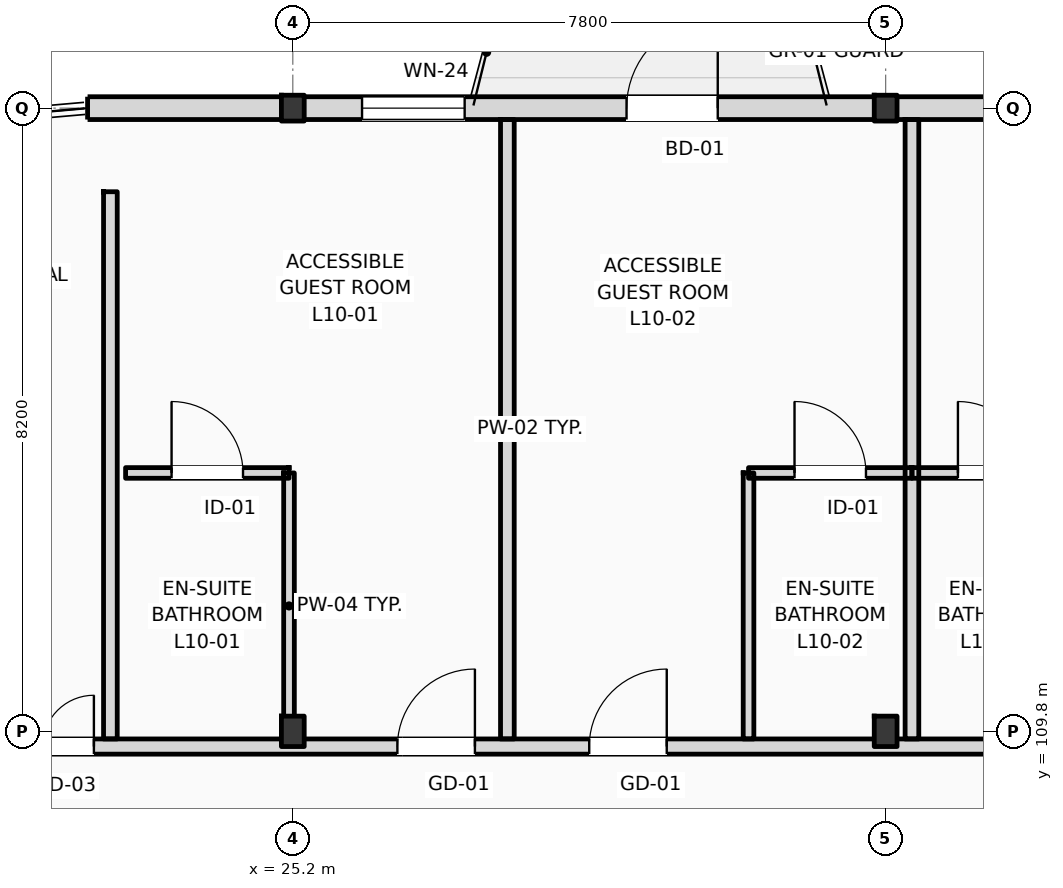
"""IFC4 building model, lengths in metres.
Left out: names, types, materials, properties, quantities, classifications, styles, units other than length and angle.
Written with IfcOpenShell. Run it as: python <this file> out.ifc"""

import sys

from ifc_helpers import new_model, si_unit, direction, frame, frame_2d, origin, origin_2d, place, context, subcontext, project, spatial, rectangle, i_section, extrude, element, fill, save


model = new_model("IFC4")
c1 = context("Model", 3, precision=1e-05, world=origin(), true_north=direction((0.0, 1.0)))
c2 = subcontext(c1, "Body", "Model", "MODEL_VIEW")
j1 = project(units=[si_unit("LENGTHUNIT", "METRE"), si_unit("PLANEANGLEUNIT", "RADIAN")], contexts=[c1])
p1 = place(None, origin())
s1 = spatial("IfcSite", under=j1, at=p1, CompositionType="ELEMENT")
p2 = place(p1, origin())
s2 = spatial("IfcBuilding", under=s1, at=p2, CompositionType="ELEMENT")
p3 = place(p2, frame((0.0, 0.0, 42.6)))
s3 = spatial("IfcBuildingStorey", under=s2, at=p3, CompositionType="ELEMENT", Elevation=42.6)
p4 = place(p3, frame((25.2, 109.8, 0.0), z_axis=(0.0, 0.0, 1.0), x_axis=(1.0, 0.0, 0.0)))
e1 = element("IfcColumn", 1, at=p4, inside=s3, PredefinedType="COLUMN", context=c2, shape_type="SweptSolid", body=[
    extrude(i_section(OverallWidth=0.3, OverallDepth=0.4, WebThickness=0.013, FlangeThickness=0.024, FilletRadius=0.027, at=origin_2d()), origin(), (0.0, 0.0, 1.0), 4.2),
])
p5 = place(p3, frame((25.2, 118.0, 0.0), z_axis=(0.0, 0.0, 1.0), x_axis=(1.0, 0.0, 0.0)))
e2 = element("IfcColumn", 2, at=p5, inside=s3, PredefinedType="COLUMN", context=c2, shape_type="SweptSolid", body=[
    extrude(i_section(OverallWidth=0.3, OverallDepth=0.34, WebThickness=0.012, FlangeThickness=0.021, FilletRadius=0.027, at=origin_2d()), origin(), (0.0, 0.0, 1.0), 4.2),
])
p6 = place(p3, frame((33.0, 109.8, 0.0), z_axis=(0.0, 0.0, 1.0), x_axis=(1.0, 0.0, 0.0)))
e3 = element("IfcColumn", 3, at=p6, inside=s3, PredefinedType="COLUMN", context=c2, shape_type="SweptSolid", body=[
    extrude(i_section(OverallWidth=0.3, OverallDepth=0.4, WebThickness=0.013, FlangeThickness=0.024, FilletRadius=0.027, at=origin_2d()), origin(), (0.0, 0.0, 1.0), 4.2),
])
p7 = place(p3, frame((33.0, 118.0, 0.0), z_axis=(0.0, 0.0, 1.0), x_axis=(1.0, 0.0, 0.0)))
e4 = element("IfcColumn", 4, at=p7, inside=s3, PredefinedType="COLUMN", context=c2, shape_type="SweptSolid", body=[
    extrude(i_section(OverallWidth=0.3, OverallDepth=0.34, WebThickness=0.012, FlangeThickness=0.021, FilletRadius=0.027, at=origin_2d()), origin(), (0.0, 0.0, 1.0), 4.2),
])
p8 = place(p3, frame((22.5, 118.0, 0.0), z_axis=(0.0, 0.0, 1.0), x_axis=(1.0, 0.0, 0.0)))
e5 = element("IfcWall", 5, at=p8, inside=s3, PredefinedType="STANDARD", context=c2, shape_type="SweptSolid", body=[
    extrude(rectangle(XDim=72.9, YDim=0.3, at=frame_2d((36.45, 0.0))), origin(), (0.0, 0.0, 1.0), 3.42),
])
p9 = place(p8, frame((3.611, 0.0, 0.9)))
e6 = element("IfcOpeningElement", 6, at=p9, cuts=e5, PredefinedType="OPENING", context=c2, shape_type="SweptSolid", body=[
    extrude(rectangle(XDim=1.35, YDim=1.75, at=frame_2d((0.675, 0.875))), frame((0.0, 0.16, 0.0), z_axis=(0.0, -1.0, 0.0), x_axis=(1.0, 0.0, 0.0)), (0.0, 0.0, 1.0), 0.32),
])
p10 = place(p8, frame((7.091, 0.0, 0.0)))
e7 = element("IfcOpeningElement", 7, at=p10, cuts=e5, PredefinedType="OPENING", context=c2, shape_type="SweptSolid", body=[
    extrude(rectangle(XDim=1.2, YDim=2.25, at=frame_2d((0.6, 1.125))), frame((0.0, 0.16, 0.0), z_axis=(0.0, -1.0, 0.0), x_axis=(1.0, 0.0, 0.0)), (0.0, 0.0, 1.0), 0.32),
])
p11 = place(p8, frame((12.328, 0.0, 0.9)))
e8 = element("IfcOpeningElement", 8, at=p11, cuts=e5, PredefinedType="OPENING", context=c2, shape_type="SweptSolid", body=[
    extrude(rectangle(XDim=2.0, YDim=2.34, at=frame_2d((1.0, 1.17))), frame((0.0, 0.16, 0.0), z_axis=(0.0, -1.0, 0.0), x_axis=(1.0, 0.0, 0.0)), (0.0, 0.0, 1.0), 0.32),
])
p12 = place(p8, frame((19.12, 0.0, 0.9)))
e9 = element("IfcOpeningElement", 9, at=p12, cuts=e5, PredefinedType="OPENING", context=c2, shape_type="SweptSolid", body=[
    extrude(rectangle(XDim=1.35, YDim=2.34, at=frame_2d((0.675, 1.17))), frame((0.0, 0.16, 0.0), z_axis=(0.0, -1.0, 0.0), x_axis=(1.0, 0.0, 0.0)), (0.0, 0.0, 1.0), 0.32),
])
p13 = place(p8, frame((22.696, 0.0, 0.0)))
e10 = element("IfcOpeningElement", 10, at=p13, cuts=e5, PredefinedType="OPENING", context=c2, shape_type="SweptSolid", body=[
    extrude(rectangle(XDim=1.2, YDim=2.25, at=frame_2d((0.6, 1.125))), frame((0.0, 0.16, 0.0), z_axis=(0.0, -1.0, 0.0), x_axis=(1.0, 0.0, 0.0)), (0.0, 0.0, 1.0), 0.32),
])
p14 = place(p8, frame((27.205, 0.0, 0.9)))
e11 = element("IfcOpeningElement", 11, at=p14, cuts=e5, PredefinedType="OPENING", context=c2, shape_type="SweptSolid", body=[
    extrude(rectangle(XDim=3.1, YDim=2.34, at=frame_2d((1.55, 1.17))), frame((0.0, 0.16, 0.0), z_axis=(0.0, -1.0, 0.0), x_axis=(1.0, 0.0, 0.0)), (0.0, 0.0, 1.0), 0.32),
])
p15 = place(p8, frame((31.948, 0.0, 0.9)))
e12 = element("IfcOpeningElement", 12, at=p15, cuts=e5, PredefinedType="OPENING", context=c2, shape_type="SweptSolid", body=[
    extrude(rectangle(XDim=1.1, YDim=2.34, at=frame_2d((0.55, 1.17))), frame((0.0, 0.16, 0.0), z_axis=(0.0, -1.0, 0.0), x_axis=(1.0, 0.0, 0.0)), (0.0, 0.0, 1.0), 0.32),
])
p16 = place(p8, frame((38.12, 0.0, 0.0)))
e13 = element("IfcOpeningElement", 13, at=p16, cuts=e5, PredefinedType="OPENING", context=c2, shape_type="SweptSolid", body=[
    extrude(rectangle(XDim=1.2, YDim=2.25, at=frame_2d((0.6, 1.125))), frame((0.0, 0.16, 0.0), z_axis=(0.0, -1.0, 0.0), x_axis=(1.0, 0.0, 0.0)), (0.0, 0.0, 1.0), 0.32),
])
p17 = place(p8, frame((43.51, 0.0, 0.9)))
e14 = element("IfcOpeningElement", 14, at=p17, cuts=e5, PredefinedType="OPENING", context=c2, shape_type="SweptSolid", body=[
    extrude(rectangle(XDim=1.35, YDim=1.85, at=frame_2d((0.675, 0.925))), frame((0.0, 0.16, 0.0), z_axis=(0.0, -1.0, 0.0), x_axis=(1.0, 0.0, 0.0)), (0.0, 0.0, 1.0), 0.32),
])
p18 = place(p8, frame((47.178, 0.0, 0.9)))
e15 = element("IfcOpeningElement", 15, at=p18, cuts=e5, PredefinedType="OPENING", context=c2, shape_type="SweptSolid", body=[
    extrude(rectangle(XDim=1.5, YDim=1.9, at=frame_2d((0.75, 0.95))), frame((0.0, 0.16, 0.0), z_axis=(0.0, -1.0, 0.0), x_axis=(1.0, 0.0, 0.0)), (0.0, 0.0, 1.0), 0.32),
])
p19 = place(p8, frame((53.724, 0.0, 0.0)))
e16 = element("IfcOpeningElement", 16, at=p19, cuts=e5, PredefinedType="OPENING", context=c2, shape_type="SweptSolid", body=[
    extrude(rectangle(XDim=1.2, YDim=2.25, at=frame_2d((0.6, 1.125))), frame((0.0, 0.16, 0.0), z_axis=(0.0, -1.0, 0.0), x_axis=(1.0, 0.0, 0.0)), (0.0, 0.0, 1.0), 0.32),
])
p20 = place(p8, frame((58.712, 0.0, 0.9)))
e17 = element("IfcOpeningElement", 17, at=p20, cuts=e5, PredefinedType="OPENING", context=c2, shape_type="SweptSolid", body=[
    extrude(rectangle(XDim=1.8, YDim=2.0, at=frame_2d((0.9, 1.0))), frame((0.0, 0.16, 0.0), z_axis=(0.0, -1.0, 0.0), x_axis=(1.0, 0.0, 0.0)), (0.0, 0.0, 1.0), 0.32),
])
p21 = place(p8, frame((62.781, 0.0, 0.9)))
e18 = element("IfcOpeningElement", 18, at=p21, cuts=e5, PredefinedType="OPENING", context=c2, shape_type="SweptSolid", body=[
    extrude(rectangle(XDim=1.35, YDim=2.05, at=frame_2d((0.675, 1.025))), frame((0.0, 0.16, 0.0), z_axis=(0.0, -1.0, 0.0), x_axis=(1.0, 0.0, 0.0)), (0.0, 0.0, 1.0), 0.32),
])
p22 = place(p8, frame((68.819, 0.0, 0.9)))
e19 = element("IfcOpeningElement", 19, at=p22, cuts=e5, PredefinedType="OPENING", context=c2, shape_type="SweptSolid", body=[
    extrude(rectangle(XDim=2.1, YDim=2.1, at=frame_2d((1.05, 1.05))), frame((0.0, 0.16, 0.0), z_axis=(0.0, -1.0, 0.0), x_axis=(1.0, 0.0, 0.0)), (0.0, 0.0, 1.0), 0.32),
])
p23 = place(p3, frame((10.65, 109.6, 0.0), z_axis=(0.0, 0.0, 1.0), x_axis=(1.0, 0.0, 0.0)))
e20 = element("IfcWall", 20, at=p23, inside=s3, PredefinedType="PARTITIONING", context=c2, shape_type="SweptSolid", body=[
    extrude(rectangle(XDim=84.61, YDim=0.2, at=frame_2d((42.305, 0.0))), origin(), (0.0, 0.0, 1.0), 3.38),
])
p24 = place(p23, frame((15.926, 0.0, 0.0)))
e21 = element("IfcOpeningElement", 21, at=p24, cuts=e20, PredefinedType="OPENING", context=c2, shape_type="SweptSolid", body=[
    extrude(rectangle(XDim=1.02, YDim=2.2, at=frame_2d((0.51, 1.1))), frame((0.0, 0.11, 0.0), z_axis=(0.0, -1.0, 0.0), x_axis=(1.0, 0.0, 0.0)), (0.0, 0.0, 1.0), 0.22),
])
p25 = place(p23, frame((18.45, 0.0, 0.0)))
e22 = element("IfcOpeningElement", 22, at=p25, cuts=e20, PredefinedType="OPENING", context=c2, shape_type="SweptSolid", body=[
    extrude(rectangle(XDim=1.02, YDim=2.2, at=frame_2d((0.51, 1.1))), frame((0.0, 0.11, 0.0), z_axis=(0.0, -1.0, 0.0), x_axis=(1.0, 0.0, 0.0)), (0.0, 0.0, 1.0), 0.22),
])
p26 = place(p23, frame((25.742, 0.0, 0.0)))
e23 = element("IfcOpeningElement", 23, at=p26, cuts=e20, PredefinedType="OPENING", context=c2, shape_type="SweptSolid", body=[
    extrude(rectangle(XDim=1.02, YDim=2.2, at=frame_2d((0.51, 1.1))), frame((0.0, 0.11, 0.0), z_axis=(0.0, -1.0, 0.0), x_axis=(1.0, 0.0, 0.0)), (0.0, 0.0, 1.0), 0.22),
])
p27 = place(p23, frame((31.385, 0.0, 0.0)))
e24 = element("IfcOpeningElement", 24, at=p27, cuts=e20, PredefinedType="OPENING", context=c2, shape_type="SweptSolid", body=[
    extrude(rectangle(XDim=1.02, YDim=2.2, at=frame_2d((0.51, 1.1))), frame((0.0, 0.11, 0.0), z_axis=(0.0, -1.0, 0.0), x_axis=(1.0, 0.0, 0.0)), (0.0, 0.0, 1.0), 0.22),
])
p28 = place(p23, frame((33.908, 0.0, 0.0)))
e25 = element("IfcOpeningElement", 25, at=p28, cuts=e20, PredefinedType="OPENING", context=c2, shape_type="SweptSolid", body=[
    extrude(rectangle(XDim=0.96, YDim=2.2, at=frame_2d((0.48, 1.1))), frame((0.0, 0.11, 0.0), z_axis=(0.0, -1.0, 0.0), x_axis=(1.0, 0.0, 0.0)), (0.0, 0.0, 1.0), 0.22),
])
p29 = place(p23, frame((41.201, 0.0, 0.0)))
e26 = element("IfcOpeningElement", 26, at=p29, cuts=e20, PredefinedType="OPENING", context=c2, shape_type="SweptSolid", body=[
    extrude(rectangle(XDim=0.96, YDim=2.2, at=frame_2d((0.48, 1.1))), frame((0.0, 0.11, 0.0), z_axis=(0.0, -1.0, 0.0), x_axis=(1.0, 0.0, 0.0)), (0.0, 0.0, 1.0), 0.22),
])
p30 = place(p23, frame((46.844, 0.0, 0.0)))
e27 = element("IfcOpeningElement", 27, at=p30, cuts=e20, PredefinedType="OPENING", context=c2, shape_type="SweptSolid", body=[
    extrude(rectangle(XDim=0.96, YDim=2.2, at=frame_2d((0.48, 1.1))), frame((0.0, 0.11, 0.0), z_axis=(0.0, -1.0, 0.0), x_axis=(1.0, 0.0, 0.0)), (0.0, 0.0, 1.0), 0.22),
])
p31 = place(p23, frame((49.337, 0.0, 0.0)))
e28 = element("IfcOpeningElement", 28, at=p31, cuts=e20, PredefinedType="OPENING", context=c2, shape_type="SweptSolid", body=[
    extrude(rectangle(XDim=0.96, YDim=2.2, at=frame_2d((0.48, 1.1))), frame((0.0, 0.11, 0.0), z_axis=(0.0, -1.0, 0.0), x_axis=(1.0, 0.0, 0.0)), (0.0, 0.0, 1.0), 0.22),
])
p32 = place(p23, frame((56.63, 0.0, 0.0)))
e29 = element("IfcOpeningElement", 29, at=p32, cuts=e20, PredefinedType="OPENING", context=c2, shape_type="SweptSolid", body=[
    extrude(rectangle(XDim=0.96, YDim=2.2, at=frame_2d((0.48, 1.1))), frame((0.0, 0.11, 0.0), z_axis=(0.0, -1.0, 0.0), x_axis=(1.0, 0.0, 0.0)), (0.0, 0.0, 1.0), 0.22),
])
p33 = place(p23, frame((62.523, 0.0, 0.0)))
e30 = element("IfcOpeningElement", 30, at=p33, cuts=e20, PredefinedType="OPENING", context=c2, shape_type="SweptSolid", body=[
    extrude(rectangle(XDim=0.96, YDim=2.2, at=frame_2d((0.48, 1.1))), frame((0.0, 0.11, 0.0), z_axis=(0.0, -1.0, 0.0), x_axis=(1.0, 0.0, 0.0)), (0.0, 0.0, 1.0), 0.22),
])
p34 = place(p23, frame((64.765, 0.0, 0.0)))
e31 = element("IfcOpeningElement", 31, at=p34, cuts=e20, PredefinedType="OPENING", context=c2, shape_type="SweptSolid", body=[
    extrude(rectangle(XDim=0.96, YDim=2.2, at=frame_2d((0.48, 1.1))), frame((0.0, 0.11, 0.0), z_axis=(0.0, -1.0, 0.0), x_axis=(1.0, 0.0, 0.0)), (0.0, 0.0, 1.0), 0.22),
])
p35 = place(p23, frame((72.057, 0.0, 0.0)))
e32 = element("IfcOpeningElement", 32, at=p35, cuts=e20, PredefinedType="OPENING", context=c2, shape_type="SweptSolid", body=[
    extrude(rectangle(XDim=0.96, YDim=2.2, at=frame_2d((0.48, 1.1))), frame((0.0, 0.11, 0.0), z_axis=(0.0, -1.0, 0.0), x_axis=(1.0, 0.0, 0.0)), (0.0, 0.0, 1.0), 0.22),
])
p36 = place(p23, frame((74.55, 0.0, 0.0)))
e33 = element("IfcOpeningElement", 33, at=p36, cuts=e20, PredefinedType="OPENING", context=c2, shape_type="SweptSolid", body=[
    extrude(rectangle(XDim=0.96, YDim=2.2, at=frame_2d((0.48, 1.1))), frame((0.0, 0.11, 0.0), z_axis=(0.0, -1.0, 0.0), x_axis=(1.0, 0.0, 0.0)), (0.0, 0.0, 1.0), 0.22),
])
p37 = place(p23, frame((80.163, 0.0, 0.0)))
e34 = element("IfcOpeningElement", 34, at=p37, cuts=e20, PredefinedType="OPENING", context=c2, shape_type="SweptSolid", body=[
    extrude(rectangle(XDim=0.96, YDim=2.2, at=frame_2d((0.48, 1.1))), frame((0.0, 0.11, 0.0), z_axis=(0.0, -1.0, 0.0), x_axis=(1.0, 0.0, 0.0)), (0.0, 0.0, 1.0), 0.22),
])
p38 = place(p23, frame((2.716, 0.0, 0.0)))
e35 = element("IfcOpeningElement", 35, at=p38, cuts=e20, PredefinedType="OPENING", context=c2, shape_type="SweptSolid", body=[
    extrude(rectangle(XDim=1.35, YDim=2.25, at=frame_2d((0.675, 1.125))), frame((0.0, 0.11, 0.0), z_axis=(0.0, -1.0, 0.0), x_axis=(1.0, 0.0, 0.0)), (0.0, 0.0, 1.0), 0.22),
])
p39 = place(p23, frame((6.65, 0.0, 0.0)))
e36 = element("IfcOpeningElement", 36, at=p39, cuts=e20, PredefinedType="OPENING", context=c2, shape_type="SweptSolid", body=[
    extrude(rectangle(XDim=1.35, YDim=2.25, at=frame_2d((0.675, 1.125))), frame((0.0, 0.11, 0.0), z_axis=(0.0, -1.0, 0.0), x_axis=(1.0, 0.0, 0.0)), (0.0, 0.0, 1.0), 0.22),
])
p40 = place(p23, frame((10.583, 0.0, 0.0)))
e37 = element("IfcOpeningElement", 37, at=p40, cuts=e20, PredefinedType="OPENING", context=c2, shape_type="SweptSolid", body=[
    extrude(rectangle(XDim=1.35, YDim=2.25, at=frame_2d((0.675, 1.125))), frame((0.0, 0.11, 0.0), z_axis=(0.0, -1.0, 0.0), x_axis=(1.0, 0.0, 0.0)), (0.0, 0.0, 1.0), 0.22),
])
p41 = place(p3, frame((28.023, 109.7, 0.0), z_axis=(0.0, 0.0, 1.0), x_axis=(0.0, 1.0, 0.0)))
e38 = element("IfcWall", 38, at=p41, inside=s3, PredefinedType="PARTITIONING", context=c2, shape_type="SweptSolid", body=[
    extrude(rectangle(XDim=8.15, YDim=0.18, at=frame_2d((4.075, 0.0))), origin(), (0.0, 0.0, 1.0), 3.63),
])
p42 = place(p3, frame((25.15, 109.7, 0.0), z_axis=(0.0, 0.0, 1.0), x_axis=(0.0, 1.0, 0.0)))
e39 = element("IfcWall", 39, at=p42, inside=s3, PredefinedType="PARTITIONING", context=c2, shape_type="SweptSolid", body=[
    extrude(rectangle(XDim=3.5, YDim=0.14, at=frame_2d((1.75, 0.0))), origin(), (0.0, 0.0, 1.0), 3.57),
])
p43 = place(p3, frame((23.0, 113.2, 0.0), z_axis=(0.0, 0.0, 1.0), x_axis=(1.0, 0.0, 0.0)))
e40 = element("IfcWall", 40, at=p43, inside=s3, PredefinedType="PARTITIONING", context=c2, shape_type="SweptSolid", body=[
    extrude(rectangle(XDim=2.15, YDim=0.14, at=frame_2d((1.075, 0.0))), origin(), (0.0, 0.0, 1.0), 3.94),
])
p44 = place(p43, frame((0.605, 0.0, 0.0)))
e41 = element("IfcOpeningElement", 41, at=p44, cuts=e40, PredefinedType="OPENING", context=c2, shape_type="SweptSolid", body=[
    extrude(rectangle(XDim=0.94, YDim=2.15, at=frame_2d((0.47, 1.075))), frame((0.0, 0.08, 0.0), z_axis=(0.0, -1.0, 0.0), x_axis=(1.0, 0.0, 0.0)), (0.0, 0.0, 1.0), 0.16),
])
p45 = place(p3, frame((33.346, 109.7, 0.0), z_axis=(0.0, 0.0, 1.0), x_axis=(0.0, 1.0, 0.0)))
e42 = element("IfcWall", 42, at=p45, inside=s3, PredefinedType="PARTITIONING", context=c2, shape_type="SweptSolid", body=[
    extrude(rectangle(XDim=8.15, YDim=0.18, at=frame_2d((4.075, 0.0))), origin(), (0.0, 0.0, 1.0), 3.94),
])
p46 = place(p3, frame((31.196, 109.7, 0.0), z_axis=(0.0, 0.0, 1.0), x_axis=(0.0, 1.0, 0.0)))
e43 = element("IfcWall", 43, at=p46, inside=s3, PredefinedType="PARTITIONING", context=c2, shape_type="SweptSolid", body=[
    extrude(rectangle(XDim=3.5, YDim=0.14, at=frame_2d((1.75, 0.0))), origin(), (0.0, 0.0, 1.0), 3.94),
])
p47 = place(p3, frame((31.196, 113.2, 0.0), z_axis=(0.0, 0.0, 1.0), x_axis=(1.0, 0.0, 0.0)))
e44 = element("IfcWall", 44, at=p47, inside=s3, PredefinedType="PARTITIONING", context=c2, shape_type="SweptSolid", body=[
    extrude(rectangle(XDim=2.15, YDim=0.14, at=frame_2d((1.075, 0.0))), origin(), (0.0, 0.0, 1.0), 3.94),
])
p48 = place(p47, frame((0.605, 0.0, 0.0)))
e45 = element("IfcOpeningElement", 45, at=p48, cuts=e44, PredefinedType="OPENING", context=c2, shape_type="SweptSolid", body=[
    extrude(rectangle(XDim=0.94, YDim=2.15, at=frame_2d((0.47, 1.075))), frame((0.0, 0.08, 0.0), z_axis=(0.0, -1.0, 0.0), x_axis=(1.0, 0.0, 0.0)), (0.0, 0.0, 1.0), 0.16),
])
p49 = place(p3, frame((33.346, 113.2, 0.0), z_axis=(0.0, 0.0, 1.0), x_axis=(1.0, 0.0, 0.0)))
e46 = element("IfcWall", 46, at=p49, inside=s3, PredefinedType="PARTITIONING", context=c2, shape_type="SweptSolid", body=[
    extrude(rectangle(XDim=2.15, YDim=0.14, at=frame_2d((1.075, 0.0))), origin(), (0.0, 0.0, 1.0), 3.94),
])
p50 = place(p49, frame((0.605, 0.0, 0.0)))
e47 = element("IfcOpeningElement", 47, at=p50, cuts=e46, PredefinedType="OPENING", context=c2, shape_type="SweptSolid", body=[
    extrude(rectangle(XDim=0.94, YDim=2.15, at=frame_2d((0.47, 1.075))), frame((0.0, 0.08, 0.0), z_axis=(0.0, -1.0, 0.0), x_axis=(1.0, 0.0, 0.0)), (0.0, 0.0, 1.0), 0.16),
])
p51 = place(p3, frame((22.8, 109.7, 0.0), z_axis=(0.0, 0.0, 1.0), x_axis=(0.0, 1.0, 0.0)))
e48 = element("IfcWall", 48, at=p51, inside=s3, PredefinedType="PARTITIONING", context=c2, shape_type="SweptSolid", body=[
    extrude(rectangle(XDim=7.2, YDim=0.18, at=frame_2d((3.6, 0.0))), origin(), (0.0, 0.0, 1.0), 3.94),
])
p52 = place(p9, origin())
e49 = element("IfcWindow", 49, at=p52, inside=s3, PartitioningType="DOUBLE_PANEL_VERTICAL", PredefinedType="WINDOW", context=c2, shape_type="SweptSolid", body=[
    extrude(rectangle(XDim=1.35, YDim=1.75, at=frame_2d((0.675, 0.875))), frame((0.0, 0.03, 0.0), z_axis=(0.0, -1.0, 0.0), x_axis=(1.0, 0.0, 0.0)), (0.0, 0.0, 1.0), 0.06),
])
fill(e6, e49)
p53 = place(p10, origin())
e50 = element("IfcDoor", 50, at=p53, inside=s3, OperationType="SINGLE_SWING_RIGHT", PredefinedType="DOOR", context=c2, shape_type="SweptSolid", body=[
    extrude(rectangle(XDim=1.2, YDim=2.25, at=frame_2d((0.6, 1.125))), frame((0.0, 0.025, 0.0), z_axis=(0.0, -1.0, 0.0), x_axis=(1.0, 0.0, 0.0)), (0.0, 0.0, 1.0), 0.05),
])
fill(e7, e50)
p54 = place(p24, origin())
e51 = element("IfcDoor", 51, at=p54, inside=s3, OperationType="SINGLE_SWING_RIGHT", PredefinedType="DOOR", context=c2, shape_type="SweptSolid", body=[
    extrude(rectangle(XDim=1.02, YDim=2.2, at=frame_2d((0.51, 1.1))), frame((0.0, 0.025, 0.0), z_axis=(0.0, -1.0, 0.0), x_axis=(1.0, 0.0, 0.0)), (0.0, 0.0, 1.0), 0.05),
])
fill(e21, e51)
p55 = place(p44, origin())
e52 = element("IfcDoor", 52, at=p55, inside=s3, OperationType="SINGLE_SWING_LEFT", PredefinedType="DOOR", context=c2, shape_type="SweptSolid", body=[
    extrude(rectangle(XDim=0.94, YDim=2.15, at=frame_2d((0.47, 1.075))), frame((0.0, 0.025, 0.0), z_axis=(0.0, -1.0, 0.0), x_axis=(1.0, 0.0, 0.0)), (0.0, 0.0, 1.0), 0.05),
])
fill(e41, e52)
p56 = place(p25, origin())
e53 = element("IfcDoor", 53, at=p56, inside=s3, OperationType="SINGLE_SWING_RIGHT", PredefinedType="DOOR", context=c2, shape_type="SweptSolid", body=[
    extrude(rectangle(XDim=1.02, YDim=2.2, at=frame_2d((0.51, 1.1))), frame((0.0, 0.025, 0.0), z_axis=(0.0, -1.0, 0.0), x_axis=(1.0, 0.0, 0.0)), (0.0, 0.0, 1.0), 0.05),
])
fill(e22, e53)
p57 = place(p48, origin())
e54 = element("IfcDoor", 54, at=p57, inside=s3, OperationType="SINGLE_SWING_LEFT", PredefinedType="DOOR", context=c2, shape_type="SweptSolid", body=[
    extrude(rectangle(XDim=0.94, YDim=2.15, at=frame_2d((0.47, 1.075))), frame((0.0, 0.025, 0.0), z_axis=(0.0, -1.0, 0.0), x_axis=(1.0, 0.0, 0.0)), (0.0, 0.0, 1.0), 0.05),
])
fill(e45, e54)
p58 = place(p50, origin())
e55 = element("IfcDoor", 55, at=p58, inside=s3, OperationType="SINGLE_SWING_LEFT", PredefinedType="DOOR", context=c2, shape_type="SweptSolid", body=[
    extrude(rectangle(XDim=0.94, YDim=2.15, at=frame_2d((0.47, 1.075))), frame((0.0, 0.025, 0.0), z_axis=(0.0, -1.0, 0.0), x_axis=(1.0, 0.0, 0.0)), (0.0, 0.0, 1.0), 0.05),
])
fill(e47, e55)
p59 = place(p40, origin())
e56 = element("IfcDoor", 56, at=p59, inside=s3, OperationType="DOUBLE_SWING_LEFT", PredefinedType="DOOR", context=c2, shape_type="SweptSolid", body=[
    extrude(rectangle(XDim=1.35, YDim=2.25, at=frame_2d((0.675, 1.125))), frame((0.0, 0.025, 0.0), z_axis=(0.0, -1.0, 0.0), x_axis=(1.0, 0.0, 0.0)), (0.0, 0.0, 1.0), 0.05),
])
fill(e37, e56)
save(model, sys.argv[1])
